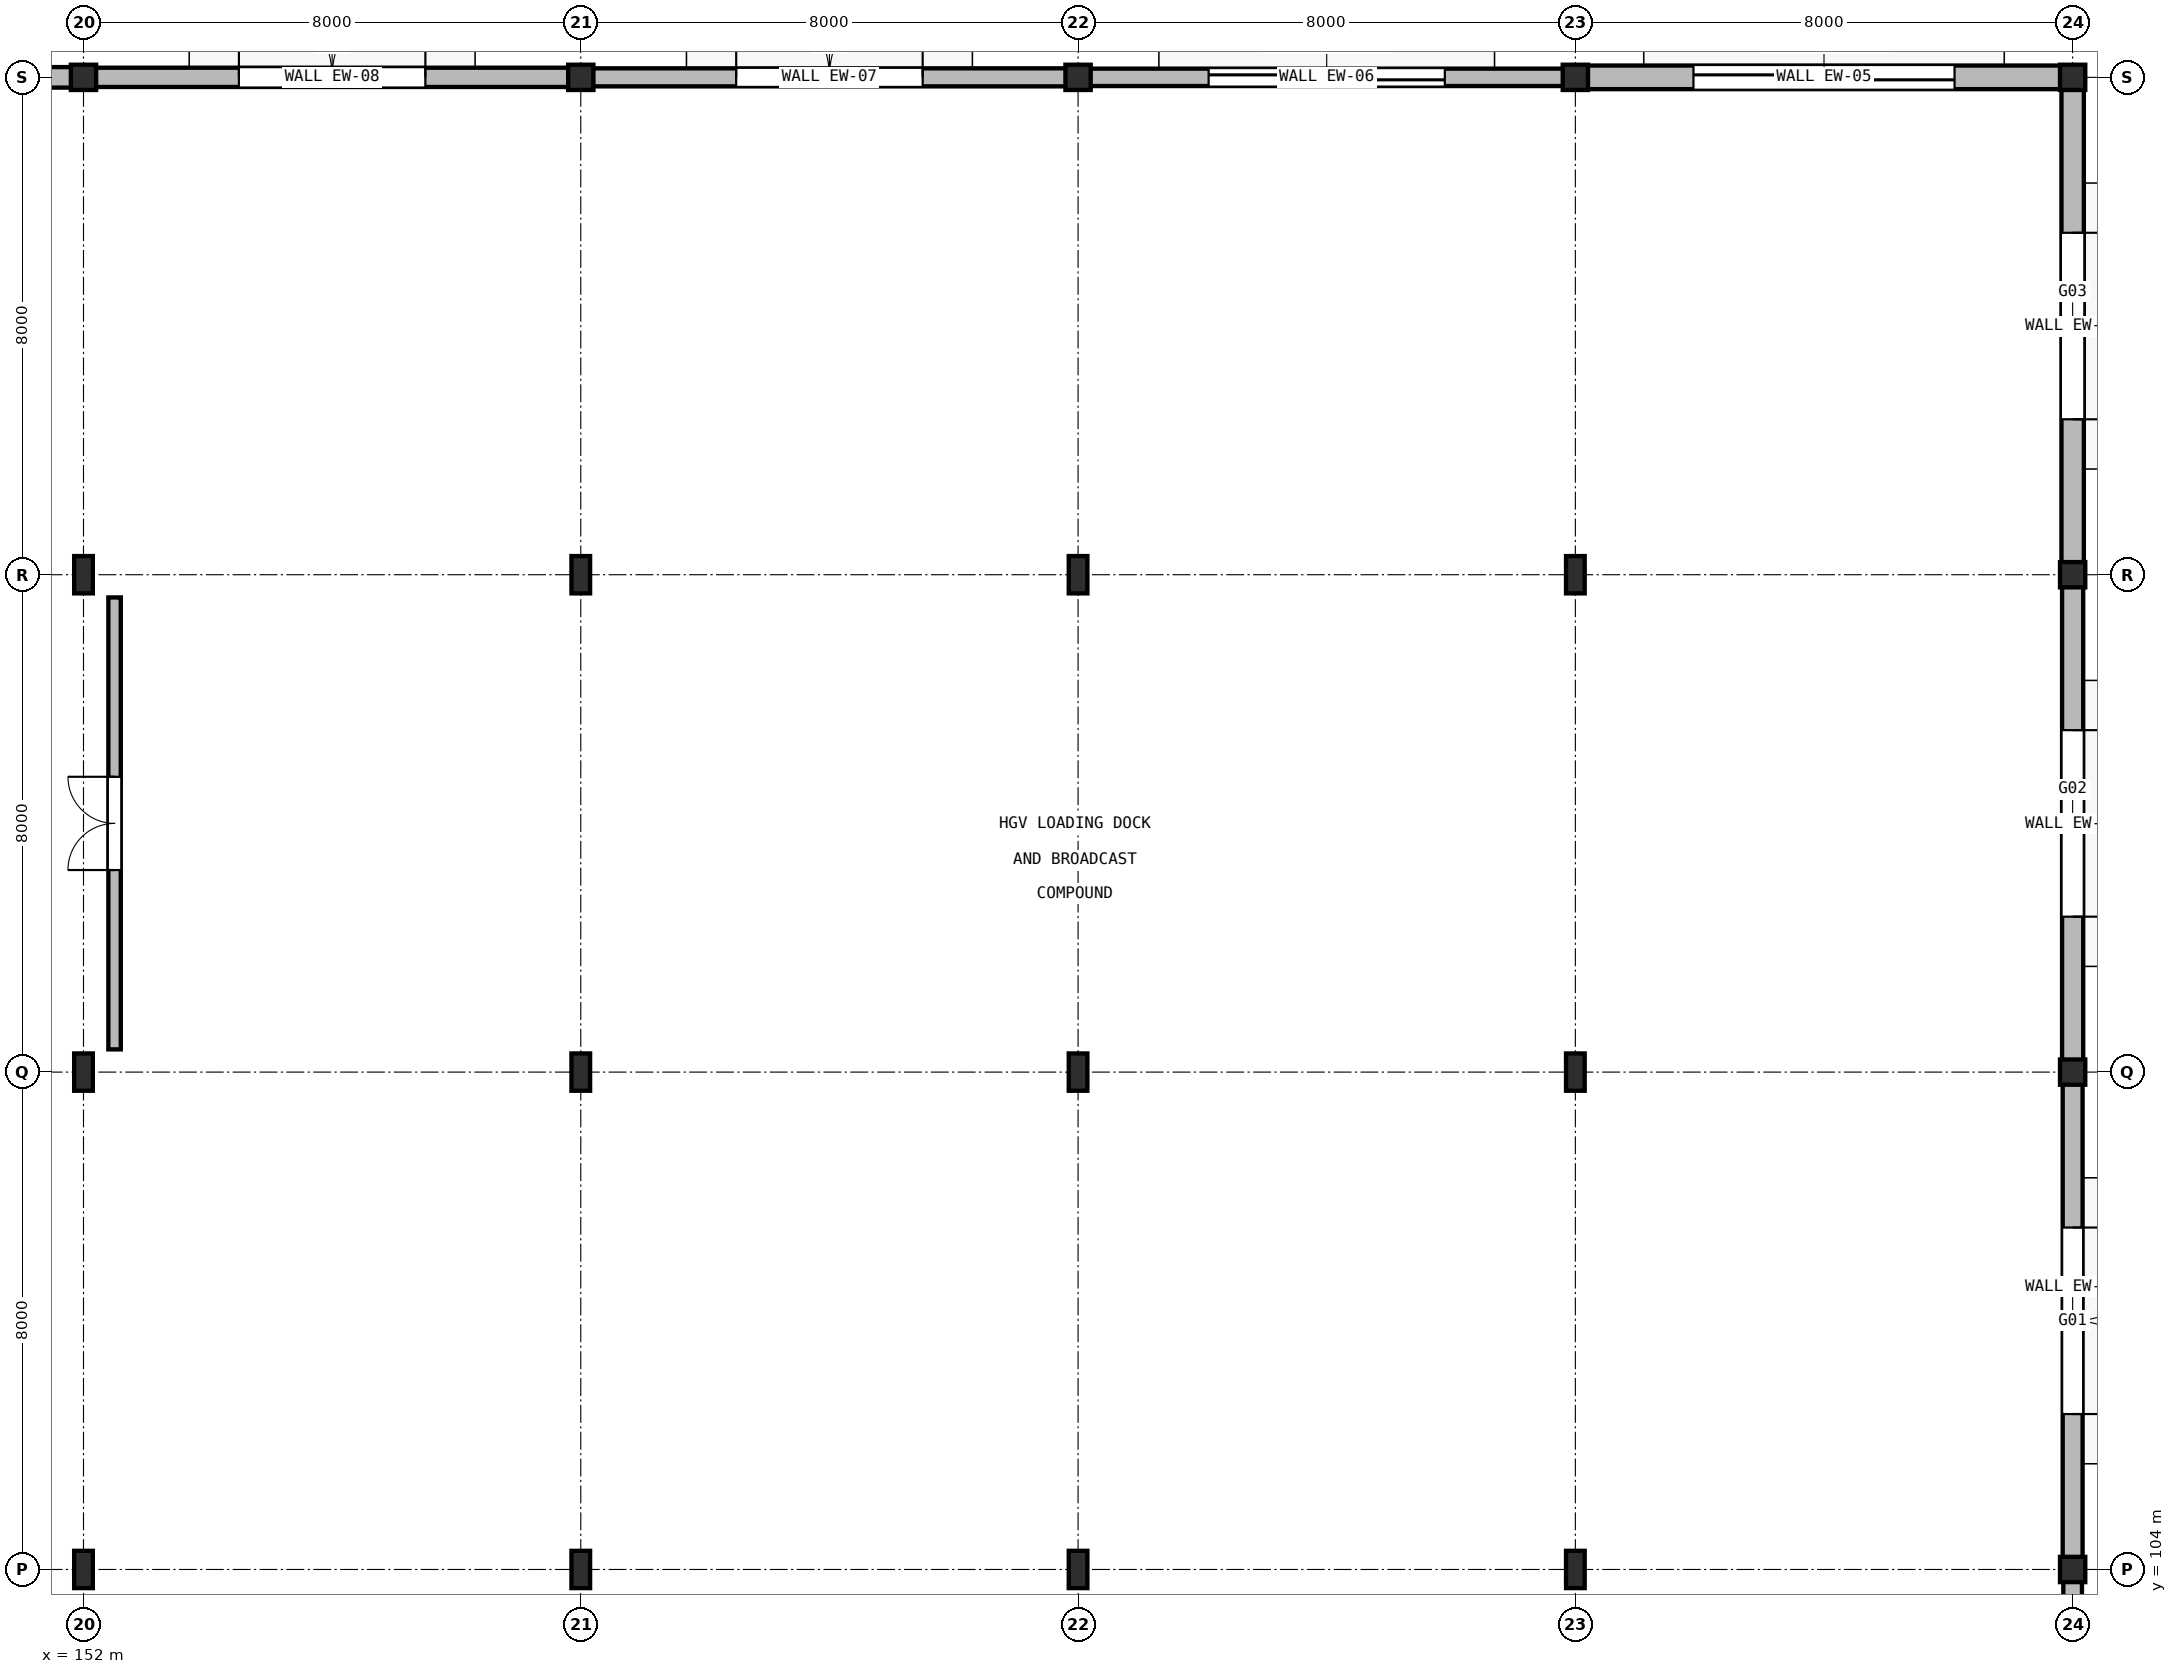
"""IFC4 building model, lengths in metres.
Left out: names, types, materials, properties, quantities, classifications, styles, units other than length and angle.
Written with IfcOpenShell. Run it as: python <this file> out.ifc"""

import sys

from ifc_helpers import new_model, si_unit, direction, frame, frame_2d, origin, origin_2d, place, context, subcontext, project, spatial, rectangle, hollow_circle, i_section, extrude, element, fill, save


model = new_model("IFC4")
c1 = context("Model", 3, precision=1e-05, world=origin(), true_north=direction((0.0, 1.0)))
c2 = subcontext(c1, "Body", "Model", "MODEL_VIEW")
j1 = project(units=[si_unit("LENGTHUNIT", "METRE"), si_unit("PLANEANGLEUNIT", "RADIAN")], contexts=[c1])
p1 = place(None, origin())
s1 = spatial("IfcSite", under=j1, at=p1, CompositionType="ELEMENT")
p2 = place(p1, origin())
s2 = spatial("IfcBuilding", under=s1, at=p2, CompositionType="ELEMENT")
p3 = place(p2, origin())
s3 = spatial("IfcBuildingStorey", under=s2, at=p3, CompositionType="ELEMENT", Elevation=0.0)
for number, where, z_axis, x_axis in (
    (1, (152.0, 104.0, 0.0), (0.0, 0.0, 1.0), (1.0, 0.0, 0.0)),
    (2, (152.0, 112.0, 0.0), (0.0, 0.0, 1.0), (1.0, 0.0, 0.0)),
    (3, (152.0, 120.0, 0.0), (0.0, 0.0, 1.0), (1.0, 0.0, 0.0)),
):
    element("IfcColumn", number, at=place(p3, frame(where, z_axis=z_axis, x_axis=x_axis)), inside=s3, PredefinedType="COLUMN", context=c2, shape_type="SweptSolid", body=[
        extrude(i_section(OverallWidth=0.3, OverallDepth=0.6, WebThickness=0.015, FlangeThickness=0.03, FilletRadius=0.027, at=origin_2d()), origin(), (0.0, 0.0, 1.0), 5.4),
    ])
p4 = place(p3, frame((152.0, 128.0, 0.0), z_axis=(0.0, 0.0, 1.0), x_axis=(1.0, 0.0, 0.0)))
e4 = element("IfcColumn", 4, at=p4, inside=s3, PredefinedType="COLUMN", context=c2, shape_type="SweptSolid", body=[
    extrude(hollow_circle(Radius=0.203, WallThickness=0.02, at=origin_2d()), origin(), (0.0, 0.0, 1.0), 5.4),
])
for number, where, z_axis, x_axis in (
    (5, (160.0, 104.0, 0.0), (0.0, 0.0, 1.0), (1.0, 0.0, 0.0)),
    (6, (160.0, 112.0, 0.0), (0.0, 0.0, 1.0), (1.0, 0.0, 0.0)),
    (7, (160.0, 120.0, 0.0), (0.0, 0.0, 1.0), (1.0, 0.0, 0.0)),
):
    element("IfcColumn", number, at=place(p3, frame(where, z_axis=z_axis, x_axis=x_axis)), inside=s3, PredefinedType="COLUMN", context=c2, shape_type="SweptSolid", body=[
        extrude(i_section(OverallWidth=0.3, OverallDepth=0.6, WebThickness=0.015, FlangeThickness=0.03, FilletRadius=0.027, at=origin_2d()), origin(), (0.0, 0.0, 1.0), 5.4),
    ])
p5 = place(p3, frame((160.0, 128.0, 0.0), z_axis=(0.0, 0.0, 1.0), x_axis=(1.0, 0.0, 0.0)))
e8 = element("IfcColumn", 8, at=p5, inside=s3, PredefinedType="COLUMN", context=c2, shape_type="SweptSolid", body=[
    extrude(hollow_circle(Radius=0.203, WallThickness=0.02, at=origin_2d()), origin(), (0.0, 0.0, 1.0), 5.4),
])
for number, where, z_axis, x_axis in (
    (9, (168.0, 104.0, 0.0), (0.0, 0.0, 1.0), (1.0, 0.0, 0.0)),
    (10, (168.0, 112.0, 0.0), (0.0, 0.0, 1.0), (1.0, 0.0, 0.0)),
    (11, (168.0, 120.0, 0.0), (0.0, 0.0, 1.0), (1.0, 0.0, 0.0)),
):
    element("IfcColumn", number, at=place(p3, frame(where, z_axis=z_axis, x_axis=x_axis)), inside=s3, PredefinedType="COLUMN", context=c2, shape_type="SweptSolid", body=[
        extrude(i_section(OverallWidth=0.3, OverallDepth=0.6, WebThickness=0.015, FlangeThickness=0.03, FilletRadius=0.027, at=origin_2d()), origin(), (0.0, 0.0, 1.0), 5.4),
    ])
p6 = place(p3, frame((168.0, 128.0, 0.0), z_axis=(0.0, 0.0, 1.0), x_axis=(1.0, 0.0, 0.0)))
e12 = element("IfcColumn", 12, at=p6, inside=s3, PredefinedType="COLUMN", context=c2, shape_type="SweptSolid", body=[
    extrude(hollow_circle(Radius=0.203, WallThickness=0.02, at=origin_2d()), origin(), (0.0, 0.0, 1.0), 5.4),
])
for number, where, z_axis, x_axis in (
    (13, (176.0, 104.0, 0.0), (0.0, 0.0, 1.0), (1.0, 0.0, 0.0)),
    (14, (176.0, 112.0, 0.0), (0.0, 0.0, 1.0), (1.0, 0.0, 0.0)),
    (15, (176.0, 120.0, 0.0), (0.0, 0.0, 1.0), (1.0, 0.0, 0.0)),
):
    element("IfcColumn", number, at=place(p3, frame(where, z_axis=z_axis, x_axis=x_axis)), inside=s3, PredefinedType="COLUMN", context=c2, shape_type="SweptSolid", body=[
        extrude(i_section(OverallWidth=0.3, OverallDepth=0.6, WebThickness=0.015, FlangeThickness=0.03, FilletRadius=0.027, at=origin_2d()), origin(), (0.0, 0.0, 1.0), 5.4),
    ])
for number, where, z_axis, x_axis in (
    (16, (176.0, 128.0, 0.0), (0.0, 0.0, 1.0), (1.0, 0.0, 0.0)),
    (17, (184.0, 104.0, 0.0), (0.0, 0.0, 1.0), (1.0, 0.0, 0.0)),
    (18, (184.0, 112.0, 0.0), (0.0, 0.0, 1.0), (1.0, 0.0, 0.0)),
    (19, (184.0, 120.0, 0.0), (0.0, 0.0, 1.0), (1.0, 0.0, 0.0)),
    (20, (184.0, 128.0, 0.0), (0.0, 0.0, 1.0), (1.0, 0.0, 0.0)),
):
    element("IfcColumn", number, at=place(p3, frame(where, z_axis=z_axis, x_axis=x_axis)), inside=s3, PredefinedType="COLUMN", context=c2, shape_type="SweptSolid", body=[
        extrude(hollow_circle(Radius=0.203, WallThickness=0.02, at=origin_2d()), origin(), (0.0, 0.0, 1.0), 5.4),
    ])
p7 = place(p3, frame((184.0, 103.817, 0.0), z_axis=(0.0, 0.0, 1.0), x_axis=(0.0, -1.0, 0.0)))
e21 = element("IfcWall", 21, at=p7, inside=s3, PredefinedType="SOLIDWALL", context=c2, shape_type="SweptSolid", body=[
    extrude(rectangle(XDim=7.634, YDim=0.3, at=frame_2d((3.817, 0.0))), origin(), (0.0, 0.0, 1.0), 4.51),
])
p8 = place(p3, frame((184.0, 111.817, 0.0), z_axis=(0.0, 0.0, 1.0), x_axis=(0.0, -1.0, 0.0)))
e22 = element("IfcWall", 22, at=p8, inside=s3, PredefinedType="SOLIDWALL", context=c2, shape_type="SweptSolid", body=[
    extrude(rectangle(XDim=7.634, YDim=0.32, at=frame_2d((3.817, 0.0))), origin(), (0.0, 0.0, 1.0), 4.51),
])
p9 = place(p8, frame((2.317, 0.0, 0.0)))
e23 = element("IfcOpeningElement", 23, at=p9, cuts=e22, PredefinedType="OPENING", context=c2, shape_type="SweptSolid", body=[
    extrude(rectangle(XDim=3.0, YDim=2.4, at=frame_2d((1.5, 1.2))), frame((0.0, 0.17, 0.0), z_axis=(0.0, -1.0, 0.0), x_axis=(1.0, 0.0, 0.0)), (0.0, 0.0, 1.0), 0.34),
])
p10 = place(p3, frame((184.0, 119.817, 0.0), z_axis=(0.0, 0.0, 1.0), x_axis=(0.0, -1.0, 0.0)))
e24 = element("IfcWall", 24, at=p10, inside=s3, PredefinedType="SOLIDWALL", context=c2, shape_type="SweptSolid", body=[
    extrude(rectangle(XDim=7.634, YDim=0.34, at=frame_2d((3.817, 0.0))), origin(), (0.0, 0.0, 1.0), 4.51),
])
p11 = place(p10, frame((2.317, 0.0, 0.0)))
e25 = element("IfcOpeningElement", 25, at=p11, cuts=e24, PredefinedType="OPENING", context=c2, shape_type="SweptSolid", body=[
    extrude(rectangle(XDim=3.0, YDim=2.4, at=frame_2d((1.5, 1.2))), frame((0.0, 0.18, 0.0), z_axis=(0.0, -1.0, 0.0), x_axis=(1.0, 0.0, 0.0)), (0.0, 0.0, 1.0), 0.36),
])
p12 = place(p3, frame((184.0, 127.817, 0.0), z_axis=(0.0, 0.0, 1.0), x_axis=(0.0, -1.0, 0.0)))
e26 = element("IfcWall", 26, at=p12, inside=s3, PredefinedType="SOLIDWALL", context=c2, shape_type="SweptSolid", body=[
    extrude(rectangle(XDim=7.634, YDim=0.36, at=frame_2d((3.817, 0.0))), origin(), (0.0, 0.0, 1.0), 4.51),
])
p13 = place(p12, frame((2.317, 0.0, 0.0)))
e27 = element("IfcOpeningElement", 27, at=p13, cuts=e26, PredefinedType="OPENING", context=c2, shape_type="SweptSolid", body=[
    extrude(rectangle(XDim=3.0, YDim=2.4, at=frame_2d((1.5, 1.2))), frame((0.0, 0.19, 0.0), z_axis=(0.0, -1.0, 0.0), x_axis=(1.0, 0.0, 0.0)), (0.0, 0.0, 1.0), 0.38),
])
p14 = place(p3, frame((176.183, 128.0, 0.0), z_axis=(0.0, 0.0, 1.0), x_axis=(1.0, 0.0, 0.0)))
e28 = element("IfcWall", 28, at=p14, inside=s3, PredefinedType="SOLIDWALL", context=c2, shape_type="SweptSolid", body=[
    extrude(rectangle(XDim=7.634, YDim=0.38, at=frame_2d((3.817, 0.0))), origin(), (0.0, 0.0, 1.0), 4.51),
])
p15 = place(p14, frame((1.717, 0.0, 0.0)))
e29 = element("IfcOpeningElement", 29, at=p15, cuts=e28, PredefinedType="OPENING", context=c2, shape_type="SweptSolid", body=[
    extrude(rectangle(XDim=4.2, YDim=3.6, at=frame_2d((2.1, 1.8))), frame((0.0, 0.2, 0.0), z_axis=(0.0, -1.0, 0.0), x_axis=(1.0, 0.0, 0.0)), (0.0, 0.0, 1.0), 0.4),
])
p16 = place(p3, frame((168.183, 128.0, 0.0), z_axis=(0.0, 0.0, 1.0), x_axis=(1.0, 0.0, 0.0)))
e30 = element("IfcWall", 30, at=p16, inside=s3, PredefinedType="SOLIDWALL", context=c2, shape_type="SweptSolid", body=[
    extrude(rectangle(XDim=7.634, YDim=0.28, at=frame_2d((3.817, 0.0))), origin(), (0.0, 0.0, 1.0), 4.51),
])
p17 = place(p16, frame((1.917, 0.0, 0.0)))
e31 = element("IfcOpeningElement", 31, at=p17, cuts=e30, PredefinedType="OPENING", context=c2, shape_type="SweptSolid", body=[
    extrude(rectangle(XDim=3.8, YDim=3.5, at=frame_2d((1.9, 1.75))), frame((0.0, 0.15, 0.0), z_axis=(0.0, -1.0, 0.0), x_axis=(1.0, 0.0, 0.0)), (0.0, 0.0, 1.0), 0.3),
])
p18 = place(p3, frame((160.183, 128.0, 0.0), z_axis=(0.0, 0.0, 1.0), x_axis=(1.0, 0.0, 0.0)))
e32 = element("IfcWall", 32, at=p18, inside=s3, PredefinedType="SOLIDWALL", context=c2, shape_type="SweptSolid", body=[
    extrude(rectangle(XDim=7.634, YDim=0.29, at=frame_2d((3.817, 0.0))), origin(), (0.0, 0.0, 1.0), 4.51),
])
p19 = place(p18, frame((2.317, 0.0, 0.0)))
e33 = element("IfcOpeningElement", 33, at=p19, cuts=e32, PredefinedType="OPENING", context=c2, shape_type="SweptSolid", body=[
    extrude(rectangle(XDim=3.0, YDim=2.4, at=frame_2d((1.5, 1.2))), frame((0.0, 0.155, 0.0), z_axis=(0.0, -1.0, 0.0), x_axis=(1.0, 0.0, 0.0)), (0.0, 0.0, 1.0), 0.31),
])
p20 = place(p3, frame((152.183, 128.0, 0.0), z_axis=(0.0, 0.0, 1.0), x_axis=(1.0, 0.0, 0.0)))
e34 = element("IfcWall", 34, at=p20, inside=s3, PredefinedType="SOLIDWALL", context=c2, shape_type="SweptSolid", body=[
    extrude(rectangle(XDim=7.634, YDim=0.31, at=frame_2d((3.817, 0.0))), origin(), (0.0, 0.0, 1.0), 4.51),
])
p21 = place(p20, frame((2.317, 0.0, 0.0)))
e35 = element("IfcOpeningElement", 35, at=p21, cuts=e34, PredefinedType="OPENING", context=c2, shape_type="SweptSolid", body=[
    extrude(rectangle(XDim=3.0, YDim=2.4, at=frame_2d((1.5, 1.2))), frame((0.0, 0.165, 0.0), z_axis=(0.0, -1.0, 0.0), x_axis=(1.0, 0.0, 0.0)), (0.0, 0.0, 1.0), 0.33),
])
p22 = place(p3, frame((144.183, 128.0, 0.0), z_axis=(0.0, 0.0, 1.0), x_axis=(1.0, 0.0, 0.0)))
e36 = element("IfcWall", 36, at=p22, inside=s3, PredefinedType="SOLIDWALL", context=c2, shape_type="SweptSolid", body=[
    extrude(rectangle(XDim=7.634, YDim=0.33, at=frame_2d((3.817, 0.0))), origin(), (0.0, 0.0, 1.0), 4.51),
])
p23 = place(p22, frame((2.317, 0.0, 0.0)))
e37 = element("IfcOpeningElement", 37, at=p23, cuts=e36, PredefinedType="OPENING", context=c2, shape_type="SweptSolid", body=[
    extrude(rectangle(XDim=3.0, YDim=2.4, at=frame_2d((1.5, 1.2))), frame((0.0, 0.175, 0.0), z_axis=(0.0, -1.0, 0.0), x_axis=(1.0, 0.0, 0.0)), (0.0, 0.0, 1.0), 0.35),
])
p24 = place(p3, frame((152.5, 112.365, 0.0), z_axis=(0.0, 0.0, 1.0), x_axis=(0.0, 1.0, 0.0)))
e38 = element("IfcWall", 38, at=p24, inside=s3, PredefinedType="PARTITIONING", context=c2, shape_type="SweptSolid", body=[
    extrude(rectangle(XDim=7.269, YDim=0.2, at=frame_2d((3.635, 0.0))), origin(), (0.0, 0.0, 1.0), 4.5),
])
p25 = place(p24, frame((2.885, 0.0, 0.0)))
e39 = element("IfcOpeningElement", 39, at=p25, cuts=e38, PredefinedType="OPENING", context=c2, shape_type="SweptSolid", body=[
    extrude(rectangle(XDim=1.5, YDim=2.2, at=frame_2d((0.75, 1.1))), frame((0.0, 0.11, 0.0), z_axis=(0.0, -1.0, 0.0), x_axis=(1.0, 0.0, 0.0)), (0.0, 0.0, 1.0), 0.22),
])
p26 = place(p9, origin())
e40 = element("IfcDoor", 40, at=p26, inside=s3, OperationType="DOUBLE_DOOR_SINGLE_SWING", PredefinedType="DOOR", context=c2, shape_type="SweptSolid", body=[
    extrude(rectangle(XDim=3.0, YDim=2.4, at=frame_2d((1.5, 1.2))), frame((0.0, 0.025, 0.0), z_axis=(0.0, -1.0, 0.0), x_axis=(1.0, 0.0, 0.0)), (0.0, 0.0, 1.0), 0.05),
])
fill(e23, e40)
p27 = place(p11, origin())
e41 = element("IfcDoor", 41, at=p27, inside=s3, OperationType="DOUBLE_DOOR_SINGLE_SWING", PredefinedType="DOOR", context=c2, shape_type="SweptSolid", body=[
    extrude(rectangle(XDim=3.0, YDim=2.4, at=frame_2d((1.5, 1.2))), frame((0.0, 0.025, 0.0), z_axis=(0.0, -1.0, 0.0), x_axis=(1.0, 0.0, 0.0)), (0.0, 0.0, 1.0), 0.05),
])
fill(e25, e41)
p28 = place(p13, origin())
e42 = element("IfcDoor", 42, at=p28, inside=s3, OperationType="DOUBLE_DOOR_SINGLE_SWING", PredefinedType="DOOR", context=c2, shape_type="SweptSolid", body=[
    extrude(rectangle(XDim=3.0, YDim=2.4, at=frame_2d((1.5, 1.2))), frame((0.0, 0.025, 0.0), z_axis=(0.0, -1.0, 0.0), x_axis=(1.0, 0.0, 0.0)), (0.0, 0.0, 1.0), 0.05),
])
fill(e27, e42)
p29 = place(p15, origin())
e43 = element("IfcDoor", 43, at=p29, inside=s3, OperationType="ROLLINGUP", PredefinedType="DOOR", context=c2, shape_type="SweptSolid", body=[
    extrude(rectangle(XDim=4.2, YDim=3.6, at=frame_2d((2.1, 1.8))), frame((0.0, 0.025, 0.0), z_axis=(0.0, -1.0, 0.0), x_axis=(1.0, 0.0, 0.0)), (0.0, 0.0, 1.0), 0.05),
])
fill(e29, e43)
p30 = place(p17, origin())
e44 = element("IfcDoor", 44, at=p30, inside=s3, OperationType="ROLLINGUP", PredefinedType="DOOR", context=c2, shape_type="SweptSolid", body=[
    extrude(rectangle(XDim=3.8, YDim=3.5, at=frame_2d((1.9, 1.75))), frame((0.0, 0.025, 0.0), z_axis=(0.0, -1.0, 0.0), x_axis=(1.0, 0.0, 0.0)), (0.0, 0.0, 1.0), 0.05),
])
fill(e31, e44)
p31 = place(p19, origin())
e45 = element("IfcDoor", 45, at=p31, inside=s3, OperationType="DOUBLE_DOOR_SINGLE_SWING", PredefinedType="DOOR", context=c2, shape_type="SweptSolid", body=[
    extrude(rectangle(XDim=3.0, YDim=2.4, at=frame_2d((1.5, 1.2))), frame((0.0, 0.025, 0.0), z_axis=(0.0, -1.0, 0.0), x_axis=(1.0, 0.0, 0.0)), (0.0, 0.0, 1.0), 0.05),
])
fill(e33, e45)
p32 = place(p21, origin())
e46 = element("IfcDoor", 46, at=p32, inside=s3, OperationType="DOUBLE_DOOR_SINGLE_SWING", PredefinedType="DOOR", context=c2, shape_type="SweptSolid", body=[
    extrude(rectangle(XDim=3.0, YDim=2.4, at=frame_2d((1.5, 1.2))), frame((0.0, 0.025, 0.0), z_axis=(0.0, -1.0, 0.0), x_axis=(1.0, 0.0, 0.0)), (0.0, 0.0, 1.0), 0.05),
])
fill(e35, e46)
p33 = place(p25, origin())
e47 = element("IfcDoor", 47, at=p33, inside=s3, OperationType="DOUBLE_DOOR_SINGLE_SWING", PredefinedType="DOOR", context=c2, shape_type="SweptSolid", body=[
    extrude(rectangle(XDim=1.5, YDim=2.2, at=frame_2d((0.75, 1.1))), frame((0.0, 0.025, 0.0), z_axis=(0.0, -1.0, 0.0), x_axis=(1.0, 0.0, 0.0)), (0.0, 0.0, 1.0), 0.05),
])
fill(e39, e47)
save(model, sys.argv[1])
